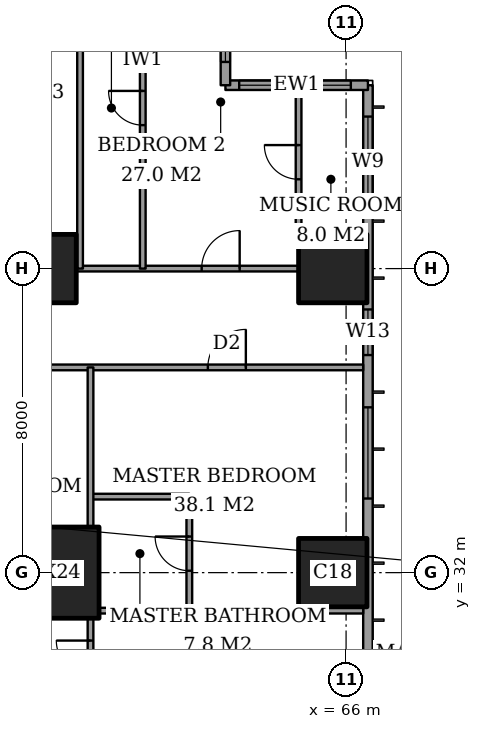
"""IFC4 building model, lengths in metres.
Left out: names, types, materials, properties, quantities, classifications, styles, units other than length and angle.
Written with IfcOpenShell. Run it as: python <this file> out.ifc"""

import sys

from ifc_helpers import new_model, si_unit, direction, frame, frame_2d, origin, origin_2d, place, context, subcontext, project, spatial, rectangle, extrude, element, fill, save


model = new_model("IFC4")
c1 = context("Model", 3, precision=1e-05, world=origin(), true_north=direction((0.0, 1.0)))
c2 = subcontext(c1, "Body", "Model", "MODEL_VIEW")
j1 = project(units=[si_unit("LENGTHUNIT", "METRE"), si_unit("PLANEANGLEUNIT", "RADIAN")], contexts=[c1])
p1 = place(None, origin())
s1 = spatial("IfcSite", under=j1, at=p1, CompositionType="ELEMENT")
p2 = place(p1, origin())
s2 = spatial("IfcBuilding", under=s1, at=p2, CompositionType="ELEMENT")
p3 = place(p2, frame((0.0, 0.0, 211.0)))
s3 = spatial("IfcBuildingStorey", under=s2, at=p3, CompositionType="ELEMENT", Elevation=211.0)
p4 = place(p3, frame((58.0, 32.0, 0.0), z_axis=(0.0, 0.0, 1.0), x_axis=(1.0, 0.0, 0.0)))
e1 = element("IfcColumn", 1, at=p4, inside=s3, PredefinedType="COLUMN", context=c2, shape_type="SweptSolid", body=[
    extrude(rectangle(XDim=3.0, YDim=2.4, at=origin_2d()), origin(), (0.0, 0.0, 1.0), 3.6),
])
for number, where, z_axis, x_axis in (
    (2, (58.0, 40.0, 0.0), (0.0, 0.0, 1.0), (1.0, 0.0, 0.0)),
    (3, (65.65, 32.0, 0.0), (0.0, 0.0, 1.0), (1.0, 0.0, 0.0)),
    (4, (65.65, 40.0, 0.0), (0.0, 0.0, 1.0), (1.0, 0.0, 0.0)),
):
    element("IfcColumn", number, at=place(p3, frame(where, z_axis=z_axis, x_axis=x_axis)), inside=s3, PredefinedType="COLUMN", context=c2, shape_type="SweptSolid", body=[
        extrude(rectangle(XDim=1.8, YDim=1.8, at=origin_2d()), origin(), (0.0, 0.0, 1.0), 3.6),
    ])
p5 = place(p3, frame((66.575, 3.175, 0.0), z_axis=(0.0, 0.0, 1.0), x_axis=(0.0, 1.0, 0.0)))
e5 = element("IfcWall", 5, at=p5, inside=s3, PredefinedType="SOLIDWALL", context=c2, shape_type="SweptSolid", body=[
    extrude(rectangle(XDim=41.65, YDim=0.25, at=frame_2d((20.825, 0.0))), origin(), (0.0, 0.0, 1.0), 3.6),
])
p6 = place(p5, frame((0.825, 0.0, 0.2)))
e6 = element("IfcOpeningElement", 6, at=p6, cuts=e5, PredefinedType="OPENING", context=c2, shape_type="SweptSolid", body=[
    extrude(rectangle(XDim=2.4, YDim=2.4, at=frame_2d((1.2, 1.2))), frame((0.0, 0.135, 0.0), z_axis=(0.0, -1.0, 0.0), x_axis=(1.0, 0.0, 0.0)), (0.0, 0.0, 1.0), 0.27),
])
p7 = place(p5, frame((6.225, 0.0, 0.2)))
e7 = element("IfcOpeningElement", 7, at=p7, cuts=e5, PredefinedType="OPENING", context=c2, shape_type="SweptSolid", body=[
    extrude(rectangle(XDim=1.2, YDim=2.4, at=frame_2d((0.6, 1.2))), frame((0.0, 0.135, 0.0), z_axis=(0.0, -1.0, 0.0), x_axis=(1.0, 0.0, 0.0)), (0.0, 0.0, 1.0), 0.27),
])
p8 = place(p5, frame((8.675, 0.0, 0.2)))
e8 = element("IfcOpeningElement", 8, at=p8, cuts=e5, PredefinedType="OPENING", context=c2, shape_type="SweptSolid", body=[
    extrude(rectangle(XDim=2.4, YDim=2.4, at=frame_2d((1.2, 1.2))), frame((0.0, 0.135, 0.0), z_axis=(0.0, -1.0, 0.0), x_axis=(1.0, 0.0, 0.0)), (0.0, 0.0, 1.0), 0.27),
])
p9 = place(p5, frame((15.675, 0.0, 0.2)))
e9 = element("IfcOpeningElement", 9, at=p9, cuts=e5, PredefinedType="OPENING", context=c2, shape_type="SweptSolid", body=[
    extrude(rectangle(XDim=2.4, YDim=2.4, at=frame_2d((1.2, 1.2))), frame((0.0, 0.135, 0.0), z_axis=(0.0, -1.0, 0.0), x_axis=(1.0, 0.0, 0.0)), (0.0, 0.0, 1.0), 0.27),
])
p10 = place(p5, frame((23.575, 0.0, 0.2)))
e10 = element("IfcOpeningElement", 10, at=p10, cuts=e5, PredefinedType="OPENING", context=c2, shape_type="SweptSolid", body=[
    extrude(rectangle(XDim=2.4, YDim=2.4, at=frame_2d((1.2, 1.2))), frame((0.0, 0.135, 0.0), z_axis=(0.0, -1.0, 0.0), x_axis=(1.0, 0.0, 0.0)), (0.0, 0.0, 1.0), 0.27),
])
p11 = place(p5, frame((30.775, 0.0, 0.2)))
e11 = element("IfcOpeningElement", 11, at=p11, cuts=e5, PredefinedType="OPENING", context=c2, shape_type="SweptSolid", body=[
    extrude(rectangle(XDim=2.4, YDim=2.4, at=frame_2d((1.2, 1.2))), frame((0.0, 0.135, 0.0), z_axis=(0.0, -1.0, 0.0), x_axis=(1.0, 0.0, 0.0)), (0.0, 0.0, 1.0), 0.27),
])
p12 = place(p5, frame((34.55, 0.0, 0.2)))
e12 = element("IfcOpeningElement", 12, at=p12, cuts=e5, PredefinedType="OPENING", context=c2, shape_type="SweptSolid", body=[
    extrude(rectangle(XDim=1.2, YDim=2.4, at=frame_2d((0.6, 1.2))), frame((0.0, 0.135, 0.0), z_axis=(0.0, -1.0, 0.0), x_axis=(1.0, 0.0, 0.0)), (0.0, 0.0, 1.0), 0.27),
])
p13 = place(p5, frame((38.425, 0.0, 0.2)))
e13 = element("IfcOpeningElement", 13, at=p13, cuts=e5, PredefinedType="OPENING", context=c2, shape_type="SweptSolid", body=[
    extrude(rectangle(XDim=2.4, YDim=2.4, at=frame_2d((1.2, 1.2))), frame((0.0, 0.135, 0.0), z_axis=(0.0, -1.0, 0.0), x_axis=(1.0, 0.0, 0.0)), (0.0, 0.0, 1.0), 0.27),
])
p14 = place(p3, frame((66.575, 44.825, 0.0), z_axis=(0.0, 0.0, 1.0), x_axis=(-1.0, 0.0, 0.0)))
e14 = element("IfcWall", 14, at=p14, inside=s3, PredefinedType="SOLIDWALL", context=c2, shape_type="SweptSolid", body=[
    extrude(rectangle(XDim=3.75, YDim=0.25, at=frame_2d((1.875, 0.0))), origin(), (0.0, 0.0, 1.0), 3.6),
])
p15 = place(p14, frame((0.45, 0.0, 0.2)))
e15 = element("IfcOpeningElement", 15, at=p15, cuts=e14, PredefinedType="OPENING", context=c2, shape_type="SweptSolid", body=[
    extrude(rectangle(XDim=1.2, YDim=2.4, at=frame_2d((0.6, 1.2))), frame((0.0, 0.135, 0.0), z_axis=(0.0, -1.0, 0.0), x_axis=(1.0, 0.0, 0.0)), (0.0, 0.0, 1.0), 0.27),
])
p16 = place(p14, frame((2.188, 0.0, 0.2)))
e16 = element("IfcOpeningElement", 16, at=p16, cuts=e14, PredefinedType="OPENING", context=c2, shape_type="SweptSolid", body=[
    extrude(rectangle(XDim=1.2, YDim=2.4, at=frame_2d((0.6, 1.2))), frame((0.0, 0.135, 0.0), z_axis=(0.0, -1.0, 0.0), x_axis=(1.0, 0.0, 0.0)), (0.0, 0.0, 1.0), 0.27),
])
p17 = place(p3, frame((62.825, 44.825, 0.0), z_axis=(0.0, 0.0, 1.0), x_axis=(0.0, 1.0, 0.0)))
e17 = element("IfcWall", 17, at=p17, inside=s3, PredefinedType="SOLIDWALL", context=c2, shape_type="SweptSolid", body=[
    extrude(rectangle(XDim=3.75, YDim=0.25, at=frame_2d((1.875, 0.0))), origin(), (0.0, 0.0, 1.0), 3.6),
])
p18 = place(p17, frame((0.613, 0.0, 0.2)))
e18 = element("IfcOpeningElement", 18, at=p18, cuts=e17, PredefinedType="OPENING", context=c2, shape_type="SweptSolid", body=[
    extrude(rectangle(XDim=2.4, YDim=2.4, at=frame_2d((1.2, 1.2))), frame((0.0, 0.135, 0.0), z_axis=(0.0, -1.0, 0.0), x_axis=(1.0, 0.0, 0.0)), (0.0, 0.0, 1.0), 0.27),
])
p19 = place(p3, frame((59.5, 31.0, 0.0), z_axis=(0.0, 0.0, 1.0), x_axis=(1.0, 0.0, 0.0)))
e19 = element("IfcWall", 19, at=p19, inside=s3, PredefinedType="PARTITIONING", context=c2, shape_type="SweptSolid", body=[
    extrude(rectangle(XDim=6.95, YDim=0.15, at=frame_2d((3.475, 0.0))), origin(), (0.0, 0.0, 1.0), 3.35),
])
p20 = place(p3, frame((59.275, 34.0, 0.0), z_axis=(0.0, 0.0, 1.0), x_axis=(1.0, 0.0, 0.0)))
e20 = element("IfcWall", 20, at=p20, inside=s3, PredefinedType="PARTITIONING", context=c2, shape_type="SweptSolid", body=[
    extrude(rectangle(XDim=2.6, YDim=0.15, at=frame_2d((1.3, 0.0))), origin(), (0.0, 0.0, 1.0), 3.35),
])
p21 = place(p3, frame((41.439, 37.4, 0.0), z_axis=(0.0, 0.0, 1.0), x_axis=(1.0, 0.0, 0.0)))
e21 = element("IfcWall", 21, at=p21, inside=s3, PredefinedType="PARTITIONING", context=c2, shape_type="SweptSolid", body=[
    extrude(rectangle(XDim=25.011, YDim=0.15, at=frame_2d((12.505, 0.0))), origin(), (0.0, 0.0, 1.0), 3.35),
])
p22 = place(p21, frame((10.761, 0.0, 0.0)))
e22 = element("IfcOpeningElement", 22, at=p22, cuts=e21, PredefinedType="OPENING", context=c2, shape_type="SweptSolid", body=[
    extrude(rectangle(XDim=1.0, YDim=2.1, at=frame_2d((0.5, 1.05))), frame((0.0, 0.085, 0.0), z_axis=(0.0, -1.0, 0.0), x_axis=(1.0, 0.0, 0.0)), (0.0, 0.0, 1.0), 0.17),
])
p23 = place(p21, frame((20.924, 0.0, 0.0)))
e23 = element("IfcOpeningElement", 23, at=p23, cuts=e21, PredefinedType="OPENING", context=c2, shape_type="SweptSolid", body=[
    extrude(rectangle(XDim=1.0, YDim=2.1, at=frame_2d((0.5, 1.05))), frame((0.0, 0.085, 0.0), z_axis=(0.0, -1.0, 0.0), x_axis=(1.0, 0.0, 0.0)), (0.0, 0.0, 1.0), 0.17),
])
p24 = place(p21, frame((15.749, 0.0, 0.0)))
e24 = element("IfcOpeningElement", 24, at=p24, cuts=e21, PredefinedType="OPENING", context=c2, shape_type="SweptSolid", body=[
    extrude(rectangle(XDim=0.9, YDim=2.1, at=frame_2d((0.45, 1.05))), frame((0.0, 0.085, 0.0), z_axis=(0.0, -1.0, 0.0), x_axis=(1.0, 0.0, 0.0)), (0.0, 0.0, 1.0), 0.17),
])
p25 = place(p21, frame((12.961, 0.0, 0.0)))
e25 = element("IfcOpeningElement", 25, at=p25, cuts=e21, PredefinedType="OPENING", context=c2, shape_type="SweptSolid", body=[
    extrude(rectangle(XDim=1.0, YDim=2.1, at=frame_2d((0.5, 1.05))), frame((0.0, 0.085, 0.0), z_axis=(0.0, -1.0, 0.0), x_axis=(1.0, 0.0, 0.0)), (0.0, 0.0, 1.0), 0.17),
])
p26 = place(p21, frame((7.911, 0.0, 0.0)))
e26 = element("IfcOpeningElement", 26, at=p26, cuts=e21, PredefinedType="OPENING", context=c2, shape_type="SweptSolid", body=[
    extrude(rectangle(XDim=0.9, YDim=2.1, at=frame_2d((0.45, 1.05))), frame((0.0, 0.085, 0.0), z_axis=(0.0, -1.0, 0.0), x_axis=(1.0, 0.0, 0.0)), (0.0, 0.0, 1.0), 0.17),
])
p27 = place(p21, frame((2.836, 0.0, 0.0)))
e27 = element("IfcOpeningElement", 27, at=p27, cuts=e21, PredefinedType="OPENING", context=c2, shape_type="SweptSolid", body=[
    extrude(rectangle(XDim=1.0, YDim=2.1, at=frame_2d((0.5, 1.05))), frame((0.0, 0.085, 0.0), z_axis=(0.0, -1.0, 0.0), x_axis=(1.0, 0.0, 0.0)), (0.0, 0.0, 1.0), 0.17),
])
p28 = place(p3, frame((58.9, 40.0, 0.0), z_axis=(0.0, 0.0, 1.0), x_axis=(1.0, 0.0, 0.0)))
e28 = element("IfcWall", 28, at=p28, inside=s3, PredefinedType="PARTITIONING", context=c2, shape_type="SweptSolid", body=[
    extrude(rectangle(XDim=5.85, YDim=0.15, at=frame_2d((2.925, 0.0))), origin(), (0.0, 0.0, 1.0), 3.35),
])
p29 = place(p28, frame((3.3, 0.0, 0.0)))
e29 = element("IfcOpeningElement", 29, at=p29, cuts=e28, PredefinedType="OPENING", context=c2, shape_type="SweptSolid", body=[
    extrude(rectangle(XDim=1.0, YDim=2.1, at=frame_2d((0.5, 1.05))), frame((0.0, 0.085, 0.0), z_axis=(0.0, -1.0, 0.0), x_axis=(1.0, 0.0, 0.0)), (0.0, 0.0, 1.0), 0.17),
])
p30 = place(p3, frame((59.0, 40.0, 0.0), z_axis=(0.0, 0.0, 1.0), x_axis=(0.0, 1.0, 0.0)))
e30 = element("IfcWall", 30, at=p30, inside=s3, PredefinedType="PARTITIONING", context=c2, shape_type="SweptSolid", body=[
    extrude(rectangle(XDim=8.45, YDim=0.15, at=frame_2d((4.225, 0.0))), origin(), (0.0, 0.0, 1.0), 3.35),
])
p31 = place(p3, frame((59.275, 28.35, 0.0), z_axis=(0.0, 0.0, 1.0), x_axis=(0.0, 1.0, 0.0)))
e31 = element("IfcWall", 31, at=p31, inside=s3, PredefinedType="PARTITIONING", context=c2, shape_type="SweptSolid", body=[
    extrude(rectangle(XDim=2.45, YDim=0.15, at=frame_2d((1.225, 0.0))), origin(), (0.0, 0.0, 1.0), 3.35),
])
p32 = place(p31, frame((0.962, 0.0, 0.0)))
e32 = element("IfcOpeningElement", 32, at=p32, cuts=e31, PredefinedType="OPENING", context=c2, shape_type="SweptSolid", body=[
    extrude(rectangle(XDim=0.9, YDim=2.1, at=frame_2d((0.45, 1.05))), frame((0.0, 0.085, 0.0), z_axis=(0.0, -1.0, 0.0), x_axis=(1.0, 0.0, 0.0)), (0.0, 0.0, 1.0), 0.17),
])
p33 = place(p3, frame((59.275, 33.2, 0.0), z_axis=(0.0, 0.0, 1.0), x_axis=(0.0, 1.0, 0.0)))
e33 = element("IfcWall", 33, at=p33, inside=s3, PredefinedType="PARTITIONING", context=c2, shape_type="SweptSolid", body=[
    extrude(rectangle(XDim=4.2, YDim=0.15, at=frame_2d((2.1, 0.0))), origin(), (0.0, 0.0, 1.0), 3.35),
])
p34 = place(p3, frame((60.65, 40.0, 0.0), z_axis=(0.0, 0.0, 1.0), x_axis=(0.0, 1.0, 0.0)))
e34 = element("IfcWall", 34, at=p34, inside=s3, PredefinedType="PARTITIONING", context=c2, shape_type="SweptSolid", body=[
    extrude(rectangle(XDim=8.45, YDim=0.15, at=frame_2d((4.225, 0.0))), origin(), (0.0, 0.0, 1.0), 3.35),
])
p35 = place(p34, frame((3.775, 0.0, 0.0)))
e35 = element("IfcOpeningElement", 35, at=p35, cuts=e34, PredefinedType="OPENING", context=c2, shape_type="SweptSolid", body=[
    extrude(rectangle(XDim=0.9, YDim=2.1, at=frame_2d((0.45, 1.05))), frame((0.0, 0.085, 0.0), z_axis=(0.0, -1.0, 0.0), x_axis=(1.0, 0.0, 0.0)), (0.0, 0.0, 1.0), 0.17),
])
p36 = place(p3, frame((61.875, 31.0, 0.0), z_axis=(0.0, 0.0, 1.0), x_axis=(0.0, 1.0, 0.0)))
e36 = element("IfcWall", 36, at=p36, inside=s3, PredefinedType="PARTITIONING", context=c2, shape_type="SweptSolid", body=[
    extrude(rectangle(XDim=3.0, YDim=0.15, at=frame_2d((1.5, 0.0))), origin(), (0.0, 0.0, 1.0), 3.35),
])
p37 = place(p36, frame((1.05, 0.0, 0.0)))
e37 = element("IfcOpeningElement", 37, at=p37, cuts=e36, PredefinedType="OPENING", context=c2, shape_type="SweptSolid", body=[
    extrude(rectangle(XDim=0.9, YDim=2.1, at=frame_2d((0.45, 1.05))), frame((0.0, 0.085, 0.0), z_axis=(0.0, -1.0, 0.0), x_axis=(1.0, 0.0, 0.0)), (0.0, 0.0, 1.0), 0.17),
])
p38 = place(p3, frame((64.75, 40.9, 0.0), z_axis=(0.0, 0.0, 1.0), x_axis=(0.0, 1.0, 0.0)))
e38 = element("IfcWall", 38, at=p38, inside=s3, PredefinedType="PARTITIONING", context=c2, shape_type="SweptSolid", body=[
    extrude(rectangle(XDim=3.8, YDim=0.15, at=frame_2d((1.9, 0.0))), origin(), (0.0, 0.0, 1.0), 3.35),
])
p39 = place(p38, frame((1.45, 0.0, 0.0)))
e39 = element("IfcOpeningElement", 39, at=p39, cuts=e38, PredefinedType="OPENING", context=c2, shape_type="SweptSolid", body=[
    extrude(rectangle(XDim=0.9, YDim=2.1, at=frame_2d((0.45, 1.05))), frame((0.0, 0.085, 0.0), z_axis=(0.0, -1.0, 0.0), x_axis=(1.0, 0.0, 0.0)), (0.0, 0.0, 1.0), 0.17),
])
p40 = place(p11, origin())
e40 = element("IfcWindow", 40, at=p40, inside=s3, PartitioningType="SINGLE_PANEL", PredefinedType="WINDOW", context=c2, shape_type="SweptSolid", body=[
    extrude(rectangle(XDim=2.4, YDim=2.4, at=frame_2d((1.2, 1.2))), frame((0.0, 0.03, 0.0), z_axis=(0.0, -1.0, 0.0), x_axis=(1.0, 0.0, 0.0)), (0.0, 0.0, 1.0), 0.06),
])
fill(e11, e40)
p41 = place(p12, origin())
e41 = element("IfcWindow", 41, at=p41, inside=s3, PartitioningType="SINGLE_PANEL", PredefinedType="WINDOW", context=c2, shape_type="SweptSolid", body=[
    extrude(rectangle(XDim=1.2, YDim=2.4, at=frame_2d((0.6, 1.2))), frame((0.0, 0.03, 0.0), z_axis=(0.0, -1.0, 0.0), x_axis=(1.0, 0.0, 0.0)), (0.0, 0.0, 1.0), 0.06),
])
fill(e12, e41)
p42 = place(p13, origin())
e42 = element("IfcWindow", 42, at=p42, inside=s3, PartitioningType="SINGLE_PANEL", PredefinedType="WINDOW", context=c2, shape_type="SweptSolid", body=[
    extrude(rectangle(XDim=2.4, YDim=2.4, at=frame_2d((1.2, 1.2))), frame((0.0, 0.03, 0.0), z_axis=(0.0, -1.0, 0.0), x_axis=(1.0, 0.0, 0.0)), (0.0, 0.0, 1.0), 0.06),
])
fill(e13, e42)
p43 = place(p15, origin())
e43 = element("IfcWindow", 43, at=p43, inside=s3, PartitioningType="SINGLE_PANEL", PredefinedType="WINDOW", context=c2, shape_type="SweptSolid", body=[
    extrude(rectangle(XDim=1.2, YDim=2.4, at=frame_2d((0.6, 1.2))), frame((0.0, 0.03, 0.0), z_axis=(0.0, -1.0, 0.0), x_axis=(1.0, 0.0, 0.0)), (0.0, 0.0, 1.0), 0.06),
])
fill(e15, e43)
p44 = place(p16, origin())
e44 = element("IfcWindow", 44, at=p44, inside=s3, PartitioningType="SINGLE_PANEL", PredefinedType="WINDOW", context=c2, shape_type="SweptSolid", body=[
    extrude(rectangle(XDim=1.2, YDim=2.4, at=frame_2d((0.6, 1.2))), frame((0.0, 0.03, 0.0), z_axis=(0.0, -1.0, 0.0), x_axis=(1.0, 0.0, 0.0)), (0.0, 0.0, 1.0), 0.06),
])
fill(e16, e44)
p45 = place(p18, origin())
e45 = element("IfcWindow", 45, at=p45, inside=s3, PartitioningType="SINGLE_PANEL", PredefinedType="WINDOW", context=c2, shape_type="SweptSolid", body=[
    extrude(rectangle(XDim=2.4, YDim=2.4, at=frame_2d((1.2, 1.2))), frame((0.0, 0.03, 0.0), z_axis=(0.0, -1.0, 0.0), x_axis=(1.0, 0.0, 0.0)), (0.0, 0.0, 1.0), 0.06),
])
fill(e18, e45)
p46 = place(p39, origin())
e46 = element("IfcDoor", 46, at=p46, inside=s3, OperationType="SINGLE_SWING_LEFT", PredefinedType="DOOR", context=c2, shape_type="SweptSolid", body=[
    extrude(rectangle(XDim=0.9, YDim=2.1, at=frame_2d((0.45, 1.05))), frame((0.0, 0.025, 0.0), z_axis=(0.0, -1.0, 0.0), x_axis=(1.0, 0.0, 0.0)), (0.0, 0.0, 1.0), 0.05),
])
fill(e39, e46)
p47 = place(p29, origin())
e47 = element("IfcDoor", 47, at=p47, inside=s3, OperationType="SINGLE_SWING_LEFT", PredefinedType="DOOR", context=c2, shape_type="SweptSolid", body=[
    extrude(rectangle(XDim=1.0, YDim=2.1, at=frame_2d((0.5, 1.05))), frame((0.0, 0.025, 0.0), z_axis=(0.0, -1.0, 0.0), x_axis=(1.0, 0.0, 0.0)), (0.0, 0.0, 1.0), 0.05),
])
fill(e29, e47)
p48 = place(p35, origin())
e48 = element("IfcDoor", 48, at=p48, inside=s3, OperationType="SINGLE_SWING_LEFT", PredefinedType="DOOR", context=c2, shape_type="SweptSolid", body=[
    extrude(rectangle(XDim=0.9, YDim=2.1, at=frame_2d((0.45, 1.05))), frame((0.0, 0.025, 0.0), z_axis=(0.0, -1.0, 0.0), x_axis=(1.0, 0.0, 0.0)), (0.0, 0.0, 1.0), 0.05),
])
fill(e35, e48)
p49 = place(p37, origin())
e49 = element("IfcDoor", 49, at=p49, inside=s3, OperationType="SINGLE_SWING_LEFT", PredefinedType="DOOR", context=c2, shape_type="SweptSolid", body=[
    extrude(rectangle(XDim=0.9, YDim=2.1, at=frame_2d((0.45, 1.05))), frame((0.0, 0.025, 0.0), z_axis=(0.0, -1.0, 0.0), x_axis=(1.0, 0.0, 0.0)), (0.0, 0.0, 1.0), 0.05),
])
fill(e37, e49)
p50 = place(p23, origin())
e50 = element("IfcDoor", 50, at=p50, inside=s3, OperationType="SINGLE_SWING_LEFT", PredefinedType="DOOR", context=c2, shape_type="SweptSolid", body=[
    extrude(rectangle(XDim=1.0, YDim=2.1, at=frame_2d((0.5, 1.05))), frame((0.0, 0.025, 0.0), z_axis=(0.0, -1.0, 0.0), x_axis=(1.0, 0.0, 0.0)), (0.0, 0.0, 1.0), 0.05),
])
fill(e23, e50)
p51 = place(p32, origin())
e51 = element("IfcDoor", 51, at=p51, inside=s3, OperationType="SINGLE_SWING_LEFT", PredefinedType="DOOR", context=c2, shape_type="SweptSolid", body=[
    extrude(rectangle(XDim=0.9, YDim=2.1, at=frame_2d((0.45, 1.05))), frame((0.0, 0.025, 0.0), z_axis=(0.0, -1.0, 0.0), x_axis=(1.0, 0.0, 0.0)), (0.0, 0.0, 1.0), 0.05),
])
fill(e32, e51)
save(model, sys.argv[1])
